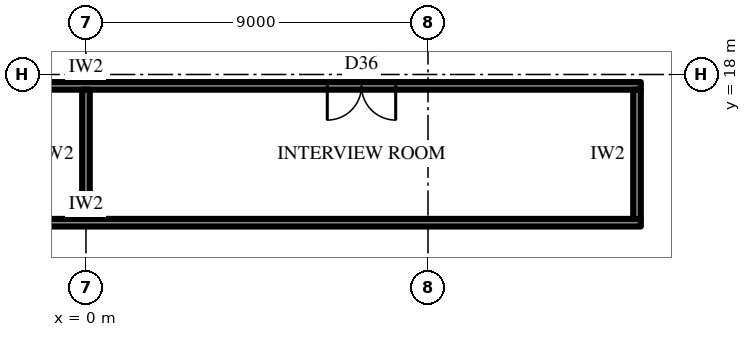
"""IFC4 building model, lengths in metres.
Left out: names, types, materials, properties, quantities, classifications, styles, units other than length and angle.
Written with IfcOpenShell. Run it as: python <this file> out.ifc"""

import sys

from ifc_helpers import new_model, si_unit, direction, frame, frame_2d, origin, place, context, subcontext, project, spatial, rectangle, extrude, element, fill, save


model = new_model("IFC4")
c1 = context("Model", 3, precision=1e-05, world=origin(), true_north=direction((0.0, 1.0)))
c2 = subcontext(c1, "Body", "Model", "MODEL_VIEW")
j1 = project(units=[si_unit("LENGTHUNIT", "METRE"), si_unit("PLANEANGLEUNIT", "RADIAN")], contexts=[c1])
p1 = place(None, origin())
s1 = spatial("IfcSite", under=j1, at=p1, CompositionType="ELEMENT")
p2 = place(p1, origin())
s2 = spatial("IfcBuilding", under=s1, at=p2, CompositionType="ELEMENT")
p3 = place(p2, frame((0.0, 0.0, 240.7)))
s3 = spatial("IfcBuildingStorey", under=s2, at=p3, CompositionType="ELEMENT", Elevation=240.7)
p4 = place(p3, frame((-14.6, 14.1, 0.0), z_axis=(0.0, 0.0, 1.0), x_axis=(1.0, 0.0, 0.0)))
e1 = element("IfcWall", 1, at=p4, inside=s3, PredefinedType="PARTITIONING", context=c2, shape_type="SweptSolid", body=[
    extrude(rectangle(XDim=29.2, YDim=0.2, at=frame_2d((14.6, 0.0))), origin(), (0.0, 0.0, 1.0), 4.0),
])
p5 = place(p3, frame((-14.6, 17.7, 0.0), z_axis=(0.0, 0.0, 1.0), x_axis=(1.0, 0.0, 0.0)))
e2 = element("IfcWall", 2, at=p5, inside=s3, PredefinedType="PARTITIONING", context=c2, shape_type="SweptSolid", body=[
    extrude(rectangle(XDim=29.2, YDim=0.2, at=frame_2d((14.6, 0.0))), origin(), (0.0, 0.0, 1.0), 4.0),
])
p6 = place(p5, frame((6.45, 0.0, 0.0)))
e3 = element("IfcOpeningElement", 3, at=p6, cuts=e2, PredefinedType="OPENING", context=c2, shape_type="SweptSolid", body=[
    extrude(rectangle(XDim=1.8, YDim=2.4, at=frame_2d((0.9, 1.2))), frame((0.0, 0.11, 0.0), z_axis=(0.0, -1.0, 0.0), x_axis=(1.0, 0.0, 0.0)), (0.0, 0.0, 1.0), 0.22),
])
p7 = place(p5, frame((20.95, 0.0, 0.0)))
e4 = element("IfcOpeningElement", 4, at=p7, cuts=e2, PredefinedType="OPENING", context=c2, shape_type="SweptSolid", body=[
    extrude(rectangle(XDim=1.8, YDim=2.4, at=frame_2d((0.9, 1.2))), frame((0.0, 0.11, 0.0), z_axis=(0.0, -1.0, 0.0), x_axis=(1.0, 0.0, 0.0)), (0.0, 0.0, 1.0), 0.22),
])
p8 = place(p3, frame((0.0, 14.2, 0.0), z_axis=(0.0, 0.0, 1.0), x_axis=(0.0, 1.0, 0.0)))
e5 = element("IfcWall", 5, at=p8, inside=s3, PredefinedType="PARTITIONING", context=c2, shape_type="SweptSolid", body=[
    extrude(rectangle(XDim=3.4, YDim=0.2, at=frame_2d((1.7, 0.0))), origin(), (0.0, 0.0, 1.0), 2.992),
])
p9 = place(p3, frame((14.5, 14.2, 0.0), z_axis=(0.0, 0.0, 1.0), x_axis=(0.0, 1.0, 0.0)))
e6 = element("IfcWall", 6, at=p9, inside=s3, PredefinedType="PARTITIONING", context=c2, shape_type="SweptSolid", body=[
    extrude(rectangle(XDim=3.4, YDim=0.2, at=frame_2d((1.7, 0.0))), origin(), (0.0, 0.0, 1.0), 4.0),
])
p10 = place(p7, frame((1.8, 0.0, 0.0), z_axis=(0.0, 0.0, 1.0), x_axis=(-1.0, 0.0, 0.0)))
e7 = element("IfcDoor", 7, at=p10, inside=s3, OperationType="DOUBLE_DOOR_SINGLE_SWING", PredefinedType="DOOR", context=c2, shape_type="SweptSolid", body=[
    extrude(rectangle(XDim=1.8, YDim=2.4, at=frame_2d((0.9, 1.2))), frame((0.0, 0.025, 0.0), z_axis=(0.0, -1.0, 0.0), x_axis=(1.0, 0.0, 0.0)), (0.0, 0.0, 1.0), 0.05),
])
fill(e4, e7)
save(model, sys.argv[1])
